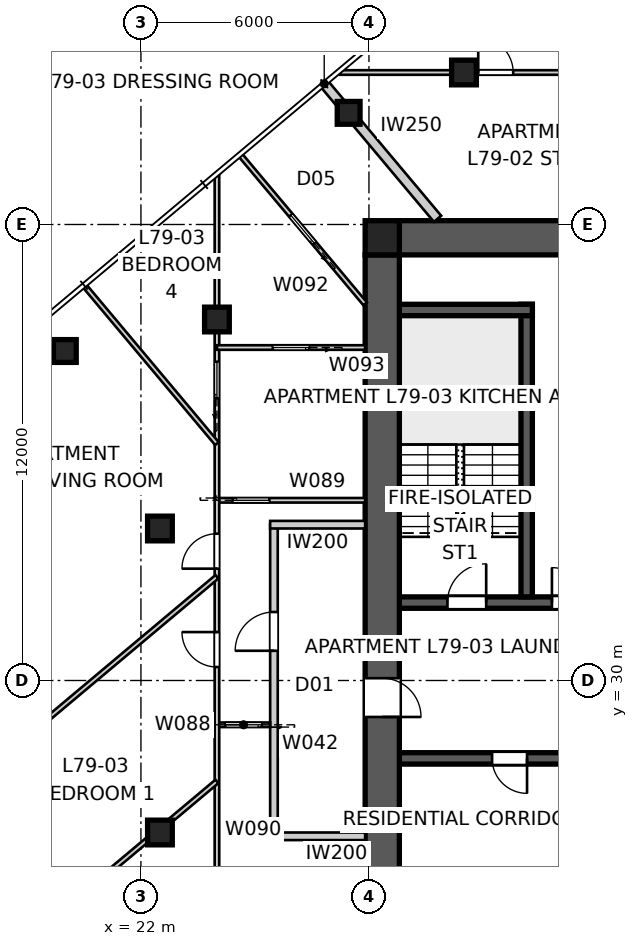
"""IFC4 building model, lengths in metres.
Left out: names, types, materials, properties, quantities, classifications, styles, units other than length and angle.
Written with IfcOpenShell. Run it as: python <this file> out.ifc"""

import sys

from ifc_helpers import new_model, si_unit, direction, frame, frame_2d, origin, origin_2d, place, context, subcontext, project, spatial, polyline, rectangle, outline, extrude, element, fill, save


model = new_model("IFC4")
c1 = context("Model", 3, precision=1e-05, world=origin(), true_north=direction((0.0, 1.0)))
c2 = subcontext(c1, "Body", "Model", "MODEL_VIEW")
j1 = project(units=[si_unit("LENGTHUNIT", "METRE"), si_unit("PLANEANGLEUNIT", "RADIAN")], contexts=[c1])
p1 = place(None, origin())
s1 = spatial("IfcSite", under=j1, at=p1, CompositionType="ELEMENT")
p2 = place(p1, origin())
s2 = spatial("IfcBuilding", under=s1, at=p2, CompositionType="ELEMENT")
p3 = place(p2, frame((0.0, 0.0, 286.2)))
s3 = spatial("IfcBuildingStorey", under=s2, at=p3, CompositionType="ELEMENT", Elevation=286.2)
p4 = place(p3, frame((28.8, 41.65, 0.0), z_axis=(0.0, 0.0, 1.0), x_axis=(1.0, 0.0, 0.0)))
e1 = element("IfcWall", 1, at=p4, inside=s3, PredefinedType="SHEAR", context=c2, shape_type="SweptSolid", body=[
    extrude(outline(polyline([(0.0, -0.45), (22.4, -0.45), (22.4, -0.025), (22.85, -0.025), (22.85, 0.025), (22.4, 0.025), (22.4, 0.45), (0.0, 0.45), (0.0, 0.025), (-0.45, 0.025), (-0.45, -0.025), (0.0, -0.025), (0.0, -0.45)])), origin(), (0.0, 0.0, 1.0), 3.4),
])
p5 = place(p3, frame((28.35, 41.2, 0.0), z_axis=(0.0, 0.0, 1.0), x_axis=(0.0, -1.0, 0.0)))
e2 = element("IfcWall", 2, at=p5, inside=s3, PredefinedType="SHEAR", context=c2, shape_type="SweptSolid", body=[
    extrude(outline(polyline([(0.0, -0.45), (22.4, -0.45), (22.4, -0.025), (22.85, -0.025), (22.85, 0.025), (22.4, 0.025), (22.4, 0.45), (0.0, 0.45), (0.0, 0.025), (-0.45, 0.025), (-0.45, -0.025), (0.0, -0.025), (0.0, -0.45)])), origin(), (0.0, 0.0, 1.0), 3.4),
])
p6 = place(p5, frame((11.14, 0.0, 0.0)))
e3 = element("IfcOpeningElement", 3, at=p6, cuts=e2, PredefinedType="OPENING", context=c2, shape_type="SweptSolid", body=[
    extrude(rectangle(XDim=1.02, YDim=2.4, at=frame_2d((0.51, 1.2))), frame((0.0, 0.46, 0.0), z_axis=(0.0, -1.0, 0.0), x_axis=(1.0, 0.0, 0.0)), (0.0, 0.0, 1.0), 0.92),
])
p7 = place(p3, frame((28.8, 32.05, 0.0), z_axis=(0.0, 0.0, 1.0), x_axis=(1.0, 0.0, 0.0)))
e4 = element("IfcWall", 4, at=p7, inside=s3, PredefinedType="SHEAR", context=c2, shape_type="SweptSolid", body=[
    extrude(rectangle(XDim=22.4, YDim=0.3, at=frame_2d((11.2, 0.0))), origin(), (0.0, 0.0, 1.0), 3.4),
])
p8 = place(p7, frame((19.04, 0.0, 0.0)))
e5 = element("IfcOpeningElement", 5, at=p8, cuts=e4, PredefinedType="OPENING", context=c2, shape_type="SweptSolid", body=[
    extrude(rectangle(XDim=0.92, YDim=2.1, at=frame_2d((0.46, 1.05))), frame((0.0, 0.16, 0.0), z_axis=(0.0, -1.0, 0.0), x_axis=(1.0, 0.0, 0.0)), (0.0, 0.0, 1.0), 0.32),
])
p9 = place(p7, frame((1.265, 0.0, 0.0)))
e6 = element("IfcOpeningElement", 6, at=p9, cuts=e4, PredefinedType="OPENING", context=c2, shape_type="SweptSolid", body=[
    extrude(rectangle(XDim=1.02, YDim=2.1, at=frame_2d((0.51, 1.05))), frame((0.0, 0.16, 0.0), z_axis=(0.0, -1.0, 0.0), x_axis=(1.0, 0.0, 0.0)), (0.0, 0.0, 1.0), 0.32),
])
p10 = place(p7, frame((4.015, 0.0, 0.0)))
e7 = element("IfcOpeningElement", 7, at=p10, cuts=e4, PredefinedType="OPENING", context=c2, shape_type="SweptSolid", body=[
    extrude(rectangle(XDim=0.92, YDim=2.1, at=frame_2d((0.46, 1.05))), frame((0.0, 0.16, 0.0), z_axis=(0.0, -1.0, 0.0), x_axis=(1.0, 0.0, 0.0)), (0.0, 0.0, 1.0), 0.32),
])
p11 = place(p7, frame((6.115, 0.0, 0.0)))
e8 = element("IfcOpeningElement", 8, at=p11, cuts=e4, PredefinedType="OPENING", context=c2, shape_type="SweptSolid", body=[
    extrude(rectangle(XDim=0.92, YDim=2.1, at=frame_2d((0.46, 1.05))), frame((0.0, 0.16, 0.0), z_axis=(0.0, -1.0, 0.0), x_axis=(1.0, 0.0, 0.0)), (0.0, 0.0, 1.0), 0.32),
])
p12 = place(p7, frame((9.79, 0.0, 0.0)))
e9 = element("IfcOpeningElement", 9, at=p12, cuts=e4, PredefinedType="OPENING", context=c2, shape_type="SweptSolid", body=[
    extrude(rectangle(XDim=0.92, YDim=2.1, at=frame_2d((0.46, 1.05))), frame((0.0, 0.16, 0.0), z_axis=(0.0, -1.0, 0.0), x_axis=(1.0, 0.0, 0.0)), (0.0, 0.0, 1.0), 0.32),
])
p13 = place(p7, frame((12.05, 0.0, 0.0)))
e10 = element("IfcOpeningElement", 10, at=p13, cuts=e4, PredefinedType="OPENING", context=c2, shape_type="SweptSolid", body=[
    extrude(rectangle(XDim=1.1, YDim=2.1, at=frame_2d((0.55, 1.05))), frame((0.0, 0.16, 0.0), z_axis=(0.0, -1.0, 0.0), x_axis=(1.0, 0.0, 0.0)), (0.0, 0.0, 1.0), 0.32),
])
p14 = place(p7, frame((14.85, 0.0, 0.0)))
e11 = element("IfcOpeningElement", 11, at=p14, cuts=e4, PredefinedType="OPENING", context=c2, shape_type="SweptSolid", body=[
    extrude(rectangle(XDim=1.1, YDim=2.1, at=frame_2d((0.55, 1.05))), frame((0.0, 0.16, 0.0), z_axis=(0.0, -1.0, 0.0), x_axis=(1.0, 0.0, 0.0)), (0.0, 0.0, 1.0), 0.32),
])
p15 = place(p3, frame((51.2, 27.95, 0.0), z_axis=(0.0, 0.0, 1.0), x_axis=(-1.0, 0.0, 0.0)))
e12 = element("IfcWall", 12, at=p15, inside=s3, PredefinedType="SHEAR", context=c2, shape_type="SweptSolid", body=[
    extrude(rectangle(XDim=22.4, YDim=0.3, at=frame_2d((11.2, 0.0))), origin(), (0.0, 0.0, 1.0), 3.4),
])
p16 = place(p15, frame((19.04, 0.0, 0.0)))
e13 = element("IfcOpeningElement", 13, at=p16, cuts=e12, PredefinedType="OPENING", context=c2, shape_type="SweptSolid", body=[
    extrude(rectangle(XDim=0.92, YDim=2.1, at=frame_2d((0.46, 1.05))), frame((0.0, 0.16, 0.0), z_axis=(0.0, -1.0, 0.0), x_axis=(1.0, 0.0, 0.0)), (0.0, 0.0, 1.0), 0.32),
])
p17 = place(p15, frame((1.265, 0.0, 0.0)))
e14 = element("IfcOpeningElement", 14, at=p17, cuts=e12, PredefinedType="OPENING", context=c2, shape_type="SweptSolid", body=[
    extrude(rectangle(XDim=1.02, YDim=2.1, at=frame_2d((0.51, 1.05))), frame((0.0, 0.16, 0.0), z_axis=(0.0, -1.0, 0.0), x_axis=(1.0, 0.0, 0.0)), (0.0, 0.0, 1.0), 0.32),
])
p18 = place(p15, frame((4.015, 0.0, 0.0)))
e15 = element("IfcOpeningElement", 15, at=p18, cuts=e12, PredefinedType="OPENING", context=c2, shape_type="SweptSolid", body=[
    extrude(rectangle(XDim=0.92, YDim=2.1, at=frame_2d((0.46, 1.05))), frame((0.0, 0.16, 0.0), z_axis=(0.0, -1.0, 0.0), x_axis=(1.0, 0.0, 0.0)), (0.0, 0.0, 1.0), 0.32),
])
p19 = place(p15, frame((9.34, 0.0, 0.0)))
e16 = element("IfcOpeningElement", 16, at=p19, cuts=e12, PredefinedType="OPENING", context=c2, shape_type="SweptSolid", body=[
    extrude(rectangle(XDim=0.92, YDim=2.1, at=frame_2d((0.46, 1.05))), frame((0.0, 0.16, 0.0), z_axis=(0.0, -1.0, 0.0), x_axis=(1.0, 0.0, 0.0)), (0.0, 0.0, 1.0), 0.32),
])
p20 = place(p15, frame((7.015, 0.0, 0.0)))
e17 = element("IfcOpeningElement", 17, at=p20, cuts=e12, PredefinedType="OPENING", context=c2, shape_type="SweptSolid", body=[
    extrude(rectangle(XDim=0.92, YDim=2.1, at=frame_2d((0.46, 1.05))), frame((0.0, 0.16, 0.0), z_axis=(0.0, -1.0, 0.0), x_axis=(1.0, 0.0, 0.0)), (0.0, 0.0, 1.0), 0.32),
])
p21 = place(p15, frame((12.05, 0.0, 0.0)))
e18 = element("IfcOpeningElement", 18, at=p21, cuts=e12, PredefinedType="OPENING", context=c2, shape_type="SweptSolid", body=[
    extrude(rectangle(XDim=1.1, YDim=2.1, at=frame_2d((0.55, 1.05))), frame((0.0, 0.16, 0.0), z_axis=(0.0, -1.0, 0.0), x_axis=(1.0, 0.0, 0.0)), (0.0, 0.0, 1.0), 0.32),
])
p22 = place(p15, frame((14.85, 0.0, 0.0)))
e19 = element("IfcOpeningElement", 19, at=p22, cuts=e12, PredefinedType="OPENING", context=c2, shape_type="SweptSolid", body=[
    extrude(rectangle(XDim=1.1, YDim=2.1, at=frame_2d((0.55, 1.05))), frame((0.0, 0.16, 0.0), z_axis=(0.0, -1.0, 0.0), x_axis=(1.0, 0.0, 0.0)), (0.0, 0.0, 1.0), 0.32),
])
p23 = place(p3, frame((32.15, 32.2, 0.0), z_axis=(0.0, 0.0, 1.0), x_axis=(0.0, 1.0, 0.0)))
e20 = element("IfcWall", 20, at=p23, inside=s3, PredefinedType="SHEAR", context=c2, shape_type="SweptSolid", body=[
    extrude(rectangle(XDim=7.7, YDim=0.3, at=frame_2d((3.85, 0.0))), origin(), (0.0, 0.0, 1.0), 3.4),
])
p24 = place(p3, frame((28.8, 39.75, 0.0), z_axis=(0.0, 0.0, 1.0), x_axis=(1.0, 0.0, 0.0)))
e21 = element("IfcWall", 21, at=p24, inside=s3, PredefinedType="SHEAR", context=c2, shape_type="SweptSolid", body=[
    extrude(rectangle(XDim=3.5, YDim=0.3, at=frame_2d((1.75, 0.0))), origin(), (0.0, 0.0, 1.0), 3.4),
])
p25 = place(p3, frame((28.35, 41.65, 0.0), z_axis=(0.0, 0.0, 1.0), x_axis=(1.0, 0.0, 0.0)))
e22 = element("IfcColumn", 22, at=p25, inside=s3, PredefinedType="COLUMN", context=c2, shape_type="SweptSolid", body=[
    extrude(rectangle(XDim=0.9, YDim=0.9, at=origin_2d()), origin(), (0.0, 0.0, 1.0), 3.4),
])
for number, where, z_axis, x_axis in (
    (23, (27.466, 44.938, 0.0), (0.0, 0.0, 1.0), (1.0, 0.0, 0.0)),
    (24, (19.997, 38.671, 0.0), (0.0, 0.0, 1.0), (1.0, 0.0, 0.0)),
):
    element("IfcColumn", number, at=place(p3, frame(where, z_axis=z_axis, x_axis=x_axis)), inside=s3, PredefinedType="COLUMN", context=c2, shape_type="SweptSolid", body=[
        extrude(rectangle(XDim=0.6, YDim=0.6, at=origin_2d()), origin(), (0.0, 0.0, 1.0), 3.4),
    ])
for number, where, z_axis, x_axis in (
    (25, (30.5, 46.0, 0.0), (0.0, 0.0, 1.0), (1.0, 0.0, 0.0)),
    (26, (24.0, 39.5, 0.0), (0.0, 0.0, 1.0), (1.0, 0.0, 0.0)),
    (27, (22.5, 34.0, 0.0), (0.0, 0.0, 1.0), (1.0, 0.0, 0.0)),
    (28, (22.5, 26.0, 0.0), (0.0, 0.0, 1.0), (1.0, 0.0, 0.0)),
):
    element("IfcColumn", number, at=place(p3, frame(where, z_axis=z_axis, x_axis=x_axis)), inside=s3, PredefinedType="COLUMN", context=c2, shape_type="SweptSolid", body=[
        extrude(rectangle(XDim=0.65, YDim=0.65, at=origin_2d()), origin(), (0.0, 0.0, 1.0), 3.4),
    ])
p26 = place(p3, frame((25.5, 25.9, 0.0), z_axis=(0.0, 0.0, 1.0), x_axis=(0.0, 1.0, 0.0)))
e29 = element("IfcWall", 29, at=p26, inside=s3, PredefinedType="PARTITIONING", context=c2, shape_type="SweptSolid", body=[
    extrude(rectangle(XDim=8.2, YDim=0.2, at=frame_2d((4.1, 0.0))), origin(), (0.0, 0.0, 1.0), 3.25),
])
p27 = place(p26, frame((4.882, 0.0, 0.0)))
e30 = element("IfcOpeningElement", 30, at=p27, cuts=e29, PredefinedType="OPENING", context=c2, shape_type="SweptSolid", body=[
    extrude(rectangle(XDim=1.02, YDim=2.34, at=frame_2d((0.51, 1.17))), frame((0.0, 0.11, 0.0), z_axis=(0.0, -1.0, 0.0), x_axis=(1.0, 0.0, 0.0)), (0.0, 0.0, 1.0), 0.22),
])
for number, where, z_axis, x_axis in (
    (31, (27.9, 34.1, 0.0), (0.0, 0.0, 1.0), (-1.0, 0.0, 0.0)),
    (32, (27.9, 25.9, 0.0), (0.0, 0.0, 1.0), (-1.0, 0.0, 0.0)),
):
    element("IfcWall", number, at=place(p3, frame(where, z_axis=z_axis, x_axis=x_axis)), inside=s3, PredefinedType="PARTITIONING", context=c2, shape_type="SweptSolid", body=[
        extrude(rectangle(XDim=2.5, YDim=0.2, at=frame_2d((1.25, 0.0))), origin(), (0.0, 0.0, 1.0), 3.25),
    ])
p28 = place(p3, frame((26.823, 45.704, 0.0), z_axis=(0.0, 0.0, 1.0), x_axis=(0.64279957712, -0.76603440109, 0.0)))
e33 = element("IfcWall", 33, at=p28, inside=s3, PredefinedType="PARTITIONING", context=c2, shape_type="SweptSolid", body=[
    extrude(rectangle(XDim=4.64, YDim=0.25, at=frame_2d((2.32, 0.0))), origin(), (0.0, 0.0, 1.0), 3.25),
])
p29 = place(p3, frame((27.238, 46.0, 0.0), z_axis=(0.0, 0.0, 1.0), x_axis=(1.0, 0.0, 0.0)))
e34 = element("IfcWall", 34, at=p29, inside=s3, PredefinedType="PARTITIONING", context=c2, shape_type="SweptSolid", body=[
    extrude(rectangle(XDim=11.915, YDim=0.12, at=frame_2d((5.957, 0.0))), origin(), (0.0, 0.0, 1.0), 2.55),
])
p30 = place(p29, frame((3.637, 0.0, 0.0)))
e35 = element("IfcOpeningElement", 35, at=p30, cuts=e34, PredefinedType="OPENING", context=c2, shape_type="SweptSolid", body=[
    extrude(rectangle(XDim=0.92, YDim=2.34, at=frame_2d((0.46, 1.17))), frame((0.0, 0.07, 0.0), z_axis=(0.0, -1.0, 0.0), x_axis=(1.0, 0.0, 0.0)), (0.0, 0.0, 1.0), 0.14),
])
p31 = place(p29, frame((10.498, 0.0, 0.0)))
e36 = element("IfcOpeningElement", 36, at=p31, cuts=e34, PredefinedType="OPENING", context=c2, shape_type="SweptSolid", body=[
    extrude(rectangle(XDim=0.96, YDim=2.1, at=frame_2d((0.48, 1.05))), frame((0.0, 0.07, 0.0), z_axis=(0.0, -1.0, 0.0), x_axis=(1.0, 0.0, 0.0)), (0.0, 0.0, 1.0), 0.14),
])
p32 = place(p3, frame((25.4, 28.834, 0.0), z_axis=(0.0, 0.0, 1.0), x_axis=(-1.0, 0.0, 0.0)))
e37 = element("IfcWall", 37, at=p32, inside=s3, PredefinedType="PARTITIONING", context=c2, shape_type="SweptSolid", body=[
    extrude(rectangle(XDim=1.4, YDim=0.12, at=frame_2d((0.7, 0.0))), origin(), (0.0, 0.0, 1.0), 3.25),
])
p33 = place(p32, frame((0.22, 0.0, 0.0)))
e38 = element("IfcOpeningElement", 38, at=p33, cuts=e37, PredefinedType="OPENING", context=c2, shape_type="SweptSolid", body=[
    extrude(rectangle(XDim=0.96, YDim=2.1, at=frame_2d((0.48, 1.05))), frame((0.0, 0.07, 0.0), z_axis=(0.0, -1.0, 0.0), x_axis=(1.0, 0.0, 0.0)), (0.0, 0.0, 1.0), 0.14),
])
p34 = place(p3, frame((24.0, 34.742, 0.0), z_axis=(0.0, 0.0, 1.0), x_axis=(1.0, 0.0, 0.0)))
e39 = element("IfcWall", 39, at=p34, inside=s3, PredefinedType="PARTITIONING", context=c2, shape_type="SweptSolid", body=[
    extrude(rectangle(XDim=3.9, YDim=0.12, at=frame_2d((1.95, 0.0))), origin(), (0.0, 0.0, 1.0), 3.25),
])
p35 = place(p34, frame((0.42, 0.0, 0.0)))
e40 = element("IfcOpeningElement", 40, at=p35, cuts=e39, PredefinedType="OPENING", context=c2, shape_type="SweptSolid", body=[
    extrude(rectangle(XDim=0.96, YDim=2.1, at=frame_2d((0.48, 1.05))), frame((0.0, 0.07, 0.0), z_axis=(0.0, -1.0, 0.0), x_axis=(1.0, 0.0, 0.0)), (0.0, 0.0, 1.0), 0.14),
])
p36 = place(p3, frame((24.0, 17.238, 0.0), z_axis=(0.0, 0.0, 1.0), x_axis=(0.0, 1.0, 0.0)))
e41 = element("IfcWall", 41, at=p36, inside=s3, PredefinedType="PARTITIONING", context=c2, shape_type="SweptSolid", body=[
    extrude(rectangle(XDim=26.045, YDim=0.12, at=frame_2d((13.022, 0.0))), origin(), (0.0, 0.0, 1.0), 2.55),
])
p37 = place(p36, frame((13.116, 0.0, 0.0)))
e42 = element("IfcOpeningElement", 42, at=p37, cuts=e41, PredefinedType="OPENING", context=c2, shape_type="SweptSolid", body=[
    extrude(rectangle(XDim=0.92, YDim=2.34, at=frame_2d((0.46, 1.17))), frame((0.0, 0.07, 0.0), z_axis=(0.0, -1.0, 0.0), x_axis=(1.0, 0.0, 0.0)), (0.0, 0.0, 1.0), 0.14),
])
p38 = place(p36, frame((15.705, 0.0, 0.0)))
e43 = element("IfcOpeningElement", 43, at=p38, cuts=e41, PredefinedType="OPENING", context=c2, shape_type="SweptSolid", body=[
    extrude(rectangle(XDim=0.92, YDim=2.34, at=frame_2d((0.46, 1.17))), frame((0.0, 0.07, 0.0), z_axis=(0.0, -1.0, 0.0), x_axis=(1.0, 0.0, 0.0)), (0.0, 0.0, 1.0), 0.14),
])
p39 = place(p36, frame((20.191, 0.0, 0.0)))
e44 = element("IfcOpeningElement", 44, at=p39, cuts=e41, PredefinedType="OPENING", context=c2, shape_type="SweptSolid", body=[
    extrude(rectangle(XDim=0.96, YDim=2.1, at=frame_2d((0.48, 1.05))), frame((0.0, 0.07, 0.0), z_axis=(0.0, -1.0, 0.0), x_axis=(1.0, 0.0, 0.0)), (0.0, 0.0, 1.0), 0.14),
])
p40 = place(p36, frame((3.631, 0.0, 0.0)))
e45 = element("IfcOpeningElement", 45, at=p40, cuts=e41, PredefinedType="OPENING", context=c2, shape_type="SweptSolid", body=[
    extrude(rectangle(XDim=0.92, YDim=2.34, at=frame_2d((0.46, 1.17))), frame((0.0, 0.07, 0.0), z_axis=(0.0, -1.0, 0.0), x_axis=(1.0, 0.0, 0.0)), (0.0, 0.0, 1.0), 0.14),
])
p41 = place(p3, frame((27.9, 39.913, 0.0), z_axis=(0.0, 0.0, 1.0), x_axis=(-0.64279031777, 0.766042170759, 0.0)))
e46 = element("IfcWall", 46, at=p41, inside=s3, PredefinedType="PARTITIONING", context=c2, shape_type="SweptSolid", body=[
    extrude(rectangle(XDim=5.089, YDim=0.12, at=frame_2d((2.544, 0.0))), origin(), (0.0, 0.0, 1.0), 3.25),
])
p42 = place(p41, frame((2.084, 0.0, 0.0)))
e47 = element("IfcOpeningElement", 47, at=p42, cuts=e46, PredefinedType="OPENING", context=c2, shape_type="SweptSolid", body=[
    extrude(rectangle(XDim=0.96, YDim=2.1, at=frame_2d((0.48, 1.05))), frame((0.0, 0.07, 0.0), z_axis=(0.0, -1.0, 0.0), x_axis=(1.0, 0.0, 0.0)), (0.0, 0.0, 1.0), 0.14),
])
p43 = place(p3, frame((27.9, 38.762, 0.0), z_axis=(0.0, 0.0, 1.0), x_axis=(-1.0, 0.0, 0.0)))
e48 = element("IfcWall", 48, at=p43, inside=s3, PredefinedType="PARTITIONING", context=c2, shape_type="SweptSolid", body=[
    extrude(rectangle(XDim=3.9, YDim=0.12, at=frame_2d((1.95, 0.0))), origin(), (0.0, 0.0, 1.0), 2.796),
])
p44 = place(p43, frame((1.47, 0.0, 0.0)))
e49 = element("IfcOpeningElement", 49, at=p44, cuts=e48, PredefinedType="OPENING", context=c2, shape_type="SweptSolid", body=[
    extrude(rectangle(XDim=0.96, YDim=2.1, at=frame_2d((0.48, 1.05))), frame((0.0, 0.07, 0.0), z_axis=(0.0, -1.0, 0.0), x_axis=(1.0, 0.0, 0.0)), (0.0, 0.0, 1.0), 0.14),
])
p45 = place(p3, frame((24.0, 32.729, 0.0), z_axis=(0.0, 0.0, 1.0), x_axis=(-0.766044319693, -0.64278775678, 0.0)))
e50 = element("IfcWall", 50, at=p45, inside=s3, PredefinedType="PARTITIONING", context=c2, shape_type="SweptSolid", body=[
    extrude(rectangle(XDim=9.957, YDim=0.12, at=frame_2d((4.979, 0.0))), origin(), (0.0, 0.0, 1.0), 3.25),
])
p46 = place(p3, frame((20.529, 40.37, 0.0), z_axis=(0.0, 0.0, 1.0), x_axis=(0.642799726543, -0.766034275706, 0.0)))
e51 = element("IfcWall", 51, at=p46, inside=s3, PredefinedType="PARTITIONING", context=c2, shape_type="SweptSolid", body=[
    extrude(rectangle(XDim=5.4, YDim=0.12, at=frame_2d((2.7, 0.0))), origin(), (0.0, 0.0, 1.0), 3.25),
])
p47 = place(p3, frame((24.0, 27.344, 0.0), z_axis=(0.0, 0.0, 1.0), x_axis=(-0.766051249233, -0.642779498388, 0.0)))
e52 = element("IfcWall", 52, at=p47, inside=s3, PredefinedType="PARTITIONING", context=c2, shape_type="SweptSolid", body=[
    extrude(rectangle(XDim=6.496, YDim=0.12, at=frame_2d((3.248, 0.0))), origin(), (0.0, 0.0, 1.0), 3.25),
])
p48 = place(p16, origin())
e53 = element("IfcDoor", 53, at=p48, inside=s3, OperationType="SINGLE_SWING_LEFT", PredefinedType="DOOR", context=c2, shape_type="SweptSolid", body=[
    extrude(rectangle(XDim=0.92, YDim=2.1, at=frame_2d((0.46, 1.05))), frame((0.0, 0.025, 0.0), z_axis=(0.0, -1.0, 0.0), x_axis=(1.0, 0.0, 0.0)), (0.0, 0.0, 1.0), 0.05),
])
fill(e13, e53)
p49 = place(p9, origin())
e54 = element("IfcDoor", 54, at=p49, inside=s3, OperationType="SINGLE_SWING_RIGHT", PredefinedType="DOOR", context=c2, shape_type="SweptSolid", body=[
    extrude(rectangle(XDim=1.02, YDim=2.1, at=frame_2d((0.51, 1.05))), frame((0.0, 0.025, 0.0), z_axis=(0.0, -1.0, 0.0), x_axis=(1.0, 0.0, 0.0)), (0.0, 0.0, 1.0), 0.05),
])
fill(e6, e54)
p50 = place(p10, origin())
e55 = element("IfcDoor", 55, at=p50, inside=s3, OperationType="SINGLE_SWING_LEFT", PredefinedType="DOOR", context=c2, shape_type="SweptSolid", body=[
    extrude(rectangle(XDim=0.92, YDim=2.1, at=frame_2d((0.46, 1.05))), frame((0.0, 0.025, 0.0), z_axis=(0.0, -1.0, 0.0), x_axis=(1.0, 0.0, 0.0)), (0.0, 0.0, 1.0), 0.05),
])
fill(e7, e55)
p51 = place(p27, origin())
e56 = element("IfcDoor", 56, at=p51, inside=s3, OperationType="SINGLE_SWING_LEFT", PredefinedType="DOOR", context=c2, shape_type="SweptSolid", body=[
    extrude(rectangle(XDim=1.02, YDim=2.34, at=frame_2d((0.51, 1.17))), frame((0.0, 0.025, 0.0), z_axis=(0.0, -1.0, 0.0), x_axis=(1.0, 0.0, 0.0)), (0.0, 0.0, 1.0), 0.05),
])
fill(e30, e56)
p52 = place(p37, origin())
e57 = element("IfcDoor", 57, at=p52, inside=s3, OperationType="SINGLE_SWING_RIGHT", PredefinedType="DOOR", context=c2, shape_type="SweptSolid", body=[
    extrude(rectangle(XDim=0.92, YDim=2.34, at=frame_2d((0.46, 1.17))), frame((0.0, 0.025, 0.0), z_axis=(0.0, -1.0, 0.0), x_axis=(1.0, 0.0, 0.0)), (0.0, 0.0, 1.0), 0.05),
])
fill(e42, e57)
p53 = place(p35, origin())
e58 = element("IfcDoor", 58, at=p53, inside=s3, OperationType="SLIDING_TO_LEFT", PredefinedType="DOOR", context=c2, shape_type="SweptSolid", body=[
    extrude(rectangle(XDim=0.96, YDim=2.1, at=frame_2d((0.48, 1.05))), frame((0.0, 0.025, 0.0), z_axis=(0.0, -1.0, 0.0), x_axis=(1.0, 0.0, 0.0)), (0.0, 0.0, 1.0), 0.05),
])
fill(e40, e58)
p54 = place(p38, origin())
e59 = element("IfcDoor", 59, at=p54, inside=s3, OperationType="SINGLE_SWING_LEFT", PredefinedType="DOOR", context=c2, shape_type="SweptSolid", body=[
    extrude(rectangle(XDim=0.92, YDim=2.34, at=frame_2d((0.46, 1.17))), frame((0.0, 0.025, 0.0), z_axis=(0.0, -1.0, 0.0), x_axis=(1.0, 0.0, 0.0)), (0.0, 0.0, 1.0), 0.05),
])
fill(e43, e59)
p55 = place(p33, origin())
e60 = element("IfcDoor", 60, at=p55, inside=s3, OperationType="SLIDING_TO_LEFT", PredefinedType="DOOR", context=c2, shape_type="SweptSolid", body=[
    extrude(rectangle(XDim=0.96, YDim=2.1, at=frame_2d((0.48, 1.05))), frame((0.0, 0.025, 0.0), z_axis=(0.0, -1.0, 0.0), x_axis=(1.0, 0.0, 0.0)), (0.0, 0.0, 1.0), 0.05),
])
fill(e38, e60)
p56 = place(p44, origin())
e61 = element("IfcDoor", 61, at=p56, inside=s3, OperationType="SLIDING_TO_LEFT", PredefinedType="DOOR", context=c2, shape_type="SweptSolid", body=[
    extrude(rectangle(XDim=0.96, YDim=2.1, at=frame_2d((0.48, 1.05))), frame((0.0, 0.025, 0.0), z_axis=(0.0, -1.0, 0.0), x_axis=(1.0, 0.0, 0.0)), (0.0, 0.0, 1.0), 0.05),
])
fill(e49, e61)
p57 = place(p39, origin())
e62 = element("IfcDoor", 62, at=p57, inside=s3, OperationType="SLIDING_TO_LEFT", PredefinedType="DOOR", context=c2, shape_type="SweptSolid", body=[
    extrude(rectangle(XDim=0.96, YDim=2.1, at=frame_2d((0.48, 1.05))), frame((0.0, 0.025, 0.0), z_axis=(0.0, -1.0, 0.0), x_axis=(1.0, 0.0, 0.0)), (0.0, 0.0, 1.0), 0.05),
])
fill(e44, e62)
p58 = place(p42, origin())
e63 = element("IfcDoor", 63, at=p58, inside=s3, OperationType="SLIDING_TO_LEFT", PredefinedType="DOOR", context=c2, shape_type="SweptSolid", body=[
    extrude(rectangle(XDim=0.96, YDim=2.1, at=frame_2d((0.48, 1.05))), frame((0.0, 0.025, 0.0), z_axis=(0.0, -1.0, 0.0), x_axis=(1.0, 0.0, 0.0)), (0.0, 0.0, 1.0), 0.05),
])
fill(e47, e63)
p59 = place(p30, origin())
e64 = element("IfcDoor", 64, at=p59, inside=s3, OperationType="SINGLE_SWING_LEFT", PredefinedType="DOOR", context=c2, shape_type="SweptSolid", body=[
    extrude(rectangle(XDim=0.92, YDim=2.34, at=frame_2d((0.46, 1.17))), frame((0.0, 0.025, 0.0), z_axis=(0.0, -1.0, 0.0), x_axis=(1.0, 0.0, 0.0)), (0.0, 0.0, 1.0), 0.05),
])
fill(e35, e64)
p60 = place(p6, origin())
e65 = element("IfcDoor", 65, at=p60, inside=s3, OperationType="SINGLE_SWING_RIGHT", PredefinedType="DOOR", context=c2, shape_type="SweptSolid", body=[
    extrude(rectangle(XDim=1.02, YDim=2.4, at=frame_2d((0.51, 1.2))), frame((0.0, 0.025, 0.0), z_axis=(0.0, -1.0, 0.0), x_axis=(1.0, 0.0, 0.0)), (0.0, 0.0, 1.0), 0.05),
])
fill(e3, e65)
save(model, sys.argv[1])
